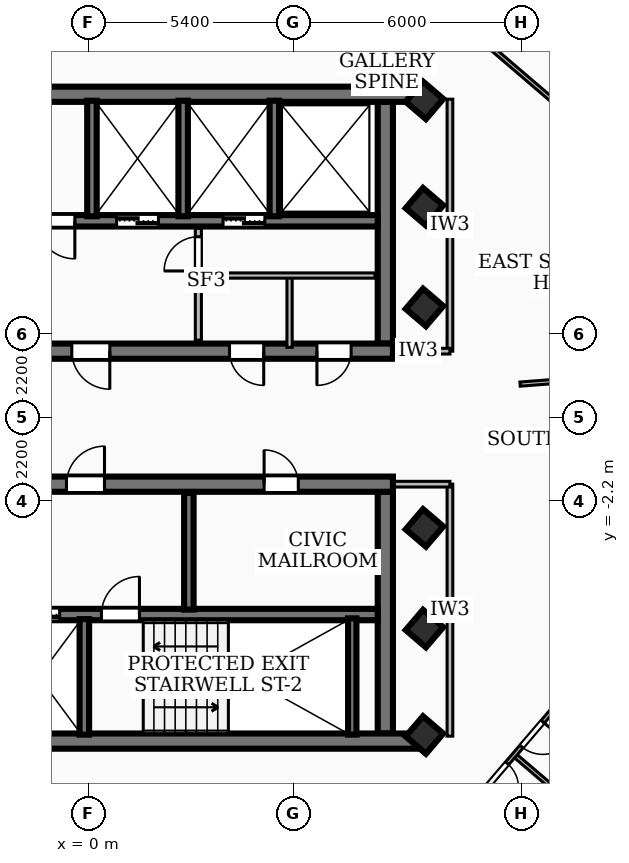
"""IFC4 building model, lengths in metres.
Left out: names, types, materials, properties, quantities, classifications, styles, units other than length and angle.
Written with IfcOpenShell. Run it as: python <this file> out.ifc"""

import sys

from ifc_helpers import new_model, si_unit, direction, frame, frame_2d, origin, origin_2d, place, context, subcontext, project, spatial, rectangle, extrude, element, fill, save


model = new_model("IFC4")
c1 = context("Model", 3, precision=1e-05, world=origin(), true_north=direction((0.0, 1.0)))
c2 = subcontext(c1, "Body", "Model", "MODEL_VIEW")
j1 = project(units=[si_unit("LENGTHUNIT", "METRE"), si_unit("PLANEANGLEUNIT", "RADIAN")], contexts=[c1])
p1 = place(None, origin())
s1 = spatial("IfcSite", under=j1, at=p1, CompositionType="ELEMENT")
p2 = place(p1, origin())
s2 = spatial("IfcBuilding", under=s1, at=p2, CompositionType="ELEMENT")
p3 = place(p2, frame((0.0, 0.0, 254.34)))
s3 = spatial("IfcBuildingStorey", under=s2, at=p3, CompositionType="ELEMENT", Elevation=254.34)
p4 = place(p3, frame((-8.78, 8.51, 0.0), z_axis=(0.0, 0.0, 1.0), x_axis=(1.0, 0.0, 0.0)))
e1 = element("IfcWall", 1, at=p4, inside=s3, PredefinedType="SHEAR", context=c2, shape_type="SweptSolid", body=[
    extrude(rectangle(XDim=17.56, YDim=0.4, at=frame_2d((8.78, 0.0))), origin(), (0.0, 0.0, 1.0), 3.16),
])
p5 = place(p3, frame((8.02, 1.75, 0.0), z_axis=(0.0, 0.0, 1.0), x_axis=(-1.0, 0.0, 0.0)))
e2 = element("IfcWall", 2, at=p5, inside=s3, PredefinedType="SHEAR", context=c2, shape_type="SweptSolid", body=[
    extrude(rectangle(XDim=16.04, YDim=0.4, at=frame_2d((8.02, 0.0))), origin(), (0.0, 0.0, 1.0), 3.16),
])
p6 = place(p5, frame((7.45, 0.0, 0.0)))
e3 = element("IfcOpeningElement", 3, at=p6, cuts=e2, PredefinedType="OPENING", context=c2, shape_type="SweptSolid", body=[
    extrude(rectangle(XDim=1.0, YDim=2.1, at=frame_2d((0.5, 1.05))), frame((0.0, 0.21, 0.0), z_axis=(0.0, -1.0, 0.0), x_axis=(1.0, 0.0, 0.0)), (0.0, 0.0, 1.0), 0.42),
])
p7 = place(p5, frame((14.285, 0.0, 0.0)))
e4 = element("IfcOpeningElement", 4, at=p7, cuts=e2, PredefinedType="OPENING", context=c2, shape_type="SweptSolid", body=[
    extrude(rectangle(XDim=1.05, YDim=2.15, at=frame_2d((0.525, 1.075))), frame((0.0, 0.21, 0.0), z_axis=(0.0, -1.0, 0.0), x_axis=(1.0, 0.0, 0.0)), (0.0, 0.0, 1.0), 0.42),
])
p8 = place(p5, frame((12.725, 0.0, 0.0)))
e5 = element("IfcOpeningElement", 5, at=p8, cuts=e2, PredefinedType="OPENING", context=c2, shape_type="SweptSolid", body=[
    extrude(rectangle(XDim=1.05, YDim=2.15, at=frame_2d((0.525, 1.075))), frame((0.0, 0.21, 0.0), z_axis=(0.0, -1.0, 0.0), x_axis=(1.0, 0.0, 0.0)), (0.0, 0.0, 1.0), 0.42),
])
p9 = place(p5, frame((11.165, 0.0, 0.0)))
e6 = element("IfcOpeningElement", 6, at=p9, cuts=e2, PredefinedType="OPENING", context=c2, shape_type="SweptSolid", body=[
    extrude(rectangle(XDim=1.05, YDim=2.15, at=frame_2d((0.525, 1.075))), frame((0.0, 0.21, 0.0), z_axis=(0.0, -1.0, 0.0), x_axis=(1.0, 0.0, 0.0)), (0.0, 0.0, 1.0), 0.42),
])
p10 = place(p5, frame((3.4, 0.0, 0.0)))
e7 = element("IfcOpeningElement", 7, at=p10, cuts=e2, PredefinedType="OPENING", context=c2, shape_type="SweptSolid", body=[
    extrude(rectangle(XDim=0.9, YDim=2.06, at=frame_2d((0.45, 1.03))), frame((0.0, 0.21, 0.0), z_axis=(0.0, -1.0, 0.0), x_axis=(1.0, 0.0, 0.0)), (0.0, 0.0, 1.0), 0.42),
])
p11 = place(p5, frame((1.1, 0.0, 0.0)))
e8 = element("IfcOpeningElement", 8, at=p11, cuts=e2, PredefinedType="OPENING", context=c2, shape_type="SweptSolid", body=[
    extrude(rectangle(XDim=0.9, YDim=2.06, at=frame_2d((0.45, 1.03))), frame((0.0, 0.21, 0.0), z_axis=(0.0, -1.0, 0.0), x_axis=(1.0, 0.0, 0.0)), (0.0, 0.0, 1.0), 0.42),
])
p12 = place(p3, frame((7.82, 8.31, 0.0), z_axis=(0.0, 0.0, 1.0), x_axis=(0.0, -1.0, 0.0)))
e9 = element("IfcWall", 9, at=p12, inside=s3, PredefinedType="SHEAR", context=c2, shape_type="SweptSolid", body=[
    extrude(rectangle(XDim=6.36, YDim=0.4, at=frame_2d((3.18, 0.0))), origin(), (0.0, 0.0, 1.0), 3.16),
])
p13 = place(p3, frame((7.62, 5.18, 0.0), z_axis=(0.0, 0.0, 1.0), x_axis=(-1.0, 0.0, 0.0)))
e10 = element("IfcWall", 10, at=p13, inside=s3, PredefinedType="SOLIDWALL", context=c2, shape_type="SweptSolid", body=[
    extrude(rectangle(XDim=15.24, YDim=0.3, at=frame_2d((7.62, 0.0))), origin(), (0.0, 0.0, 1.0), 3.16),
])
p14 = place(p13, frame((5.77, 0.0, 0.0)))
e11 = element("IfcOpeningElement", 11, at=p14, cuts=e10, PredefinedType="OPENING", context=c2, shape_type="SweptSolid", body=[
    extrude(rectangle(XDim=1.1, YDim=2.15, at=frame_2d((0.55, 1.075))), frame((0.0, 0.16, 0.0), z_axis=(0.0, -1.0, 0.0), x_axis=(1.0, 0.0, 0.0)), (0.0, 0.0, 1.0), 0.32),
])
p15 = place(p13, frame((2.97, 0.0, 0.0)))
e12 = element("IfcOpeningElement", 12, at=p15, cuts=e10, PredefinedType="OPENING", context=c2, shape_type="SweptSolid", body=[
    extrude(rectangle(XDim=1.1, YDim=2.15, at=frame_2d((0.55, 1.075))), frame((0.0, 0.16, 0.0), z_axis=(0.0, -1.0, 0.0), x_axis=(1.0, 0.0, 0.0)), (0.0, 0.0, 1.0), 0.32),
])
p16 = place(p13, frame((7.97, 0.0, 0.0)))
e13 = element("IfcOpeningElement", 13, at=p16, cuts=e10, PredefinedType="OPENING", context=c2, shape_type="SweptSolid", body=[
    extrude(rectangle(XDim=1.0, YDim=2.1, at=frame_2d((0.5, 1.05))), frame((0.0, 0.16, 0.0), z_axis=(0.0, -1.0, 0.0), x_axis=(1.0, 0.0, 0.0)), (0.0, 0.0, 1.0), 0.32),
])
p17 = place(p3, frame((8.78, -8.51, 0.0), z_axis=(0.0, 0.0, 1.0), x_axis=(-1.0, 0.0, 0.0)))
e14 = element("IfcWall", 14, at=p17, inside=s3, PredefinedType="SHEAR", context=c2, shape_type="SweptSolid", body=[
    extrude(rectangle(XDim=17.56, YDim=0.4, at=frame_2d((8.78, 0.0))), origin(), (0.0, 0.0, 1.0), 3.16),
])
p18 = place(p3, frame((-8.02, -1.75, 0.0), z_axis=(0.0, 0.0, 1.0), x_axis=(1.0, 0.0, 0.0)))
e15 = element("IfcWall", 15, at=p18, inside=s3, PredefinedType="SHEAR", context=c2, shape_type="SweptSolid", body=[
    extrude(rectangle(XDim=16.04, YDim=0.4, at=frame_2d((8.02, 0.0))), origin(), (0.0, 0.0, 1.0), 3.16),
])
p19 = place(p18, frame((7.45, 0.0, 0.0)))
e16 = element("IfcOpeningElement", 16, at=p19, cuts=e15, PredefinedType="OPENING", context=c2, shape_type="SweptSolid", body=[
    extrude(rectangle(XDim=1.0, YDim=2.1, at=frame_2d((0.5, 1.05))), frame((0.0, 0.21, 0.0), z_axis=(0.0, -1.0, 0.0), x_axis=(1.0, 0.0, 0.0)), (0.0, 0.0, 1.0), 0.42),
])
p20 = place(p18, frame((12.65, 0.0, 0.0)))
e17 = element("IfcOpeningElement", 17, at=p20, cuts=e15, PredefinedType="OPENING", context=c2, shape_type="SweptSolid", body=[
    extrude(rectangle(XDim=0.9, YDim=2.06, at=frame_2d((0.45, 1.03))), frame((0.0, 0.21, 0.0), z_axis=(0.0, -1.0, 0.0), x_axis=(1.0, 0.0, 0.0)), (0.0, 0.0, 1.0), 0.42),
])
p21 = place(p18, frame((2.25, 0.0, 0.0)))
e18 = element("IfcOpeningElement", 18, at=p21, cuts=e15, PredefinedType="OPENING", context=c2, shape_type="SweptSolid", body=[
    extrude(rectangle(XDim=0.9, YDim=2.06, at=frame_2d((0.45, 1.03))), frame((0.0, 0.21, 0.0), z_axis=(0.0, -1.0, 0.0), x_axis=(1.0, 0.0, 0.0)), (0.0, 0.0, 1.0), 0.42),
])
p22 = place(p3, frame((7.82, -1.95, 0.0), z_axis=(0.0, 0.0, 1.0), x_axis=(0.0, -1.0, 0.0)))
e19 = element("IfcWall", 19, at=p22, inside=s3, PredefinedType="SHEAR", context=c2, shape_type="SweptSolid", body=[
    extrude(rectangle(XDim=6.36, YDim=0.4, at=frame_2d((3.18, 0.0))), origin(), (0.0, 0.0, 1.0), 3.16),
])
p23 = place(p3, frame((-7.62, -5.18, 0.0), z_axis=(0.0, 0.0, 1.0), x_axis=(1.0, 0.0, 0.0)))
e20 = element("IfcWall", 20, at=p23, inside=s3, PredefinedType="SOLIDWALL", context=c2, shape_type="SweptSolid", body=[
    extrude(rectangle(XDim=15.24, YDim=0.3, at=frame_2d((7.62, 0.0))), origin(), (0.0, 0.0, 1.0), 3.16),
])
p24 = place(p23, frame((5.77, 0.0, 0.0)))
e21 = element("IfcOpeningElement", 21, at=p24, cuts=e20, PredefinedType="OPENING", context=c2, shape_type="SweptSolid", body=[
    extrude(rectangle(XDim=1.1, YDim=2.15, at=frame_2d((0.55, 1.075))), frame((0.0, 0.16, 0.0), z_axis=(0.0, -1.0, 0.0), x_axis=(1.0, 0.0, 0.0)), (0.0, 0.0, 1.0), 0.32),
])
p25 = place(p23, frame((7.97, 0.0, 0.0)))
e22 = element("IfcOpeningElement", 22, at=p25, cuts=e20, PredefinedType="OPENING", context=c2, shape_type="SweptSolid", body=[
    extrude(rectangle(XDim=1.0, YDim=2.1, at=frame_2d((0.5, 1.05))), frame((0.0, 0.16, 0.0), z_axis=(0.0, -1.0, 0.0), x_axis=(1.0, 0.0, 0.0)), (0.0, 0.0, 1.0), 0.32),
])
p26 = place(p3, frame((6.95, -8.34, 0.0), z_axis=(0.0, 0.0, 1.0), x_axis=(0.0, 1.0, 0.0)))
e23 = element("IfcWall", 23, at=p26, inside=s3, PredefinedType="SOLIDWALL", context=c2, shape_type="SweptSolid", body=[
    extrude(rectangle(XDim=3.06, YDim=0.22, at=frame_2d((1.53, 0.0))), origin(), (0.0, 0.0, 1.0), 3.16),
])
for number, where, z_axis, x_axis in (
    (24, (0.1, 5.3, 0.0), (0.0, 0.0, 1.0), (0.0, 1.0, 0.0)),
    (25, (2.5, 5.3, 0.0), (0.0, 0.0, 1.0), (0.0, 1.0, 0.0)),
    (26, (4.9, 5.3, 0.0), (0.0, 0.0, 1.0), (0.0, 1.0, 0.0)),
    (27, (-0.1, -8.34, 0.0), (0.0, 0.0, 1.0), (0.0, 1.0, 0.0)),
):
    element("IfcWall", number, at=place(p3, frame(where, z_axis=z_axis, x_axis=x_axis)), inside=s3, PredefinedType="SOLIDWALL", context=c2, shape_type="SweptSolid", body=[
        extrude(rectangle(XDim=3.04, YDim=0.25, at=frame_2d((1.52, 0.0))), origin(), (0.0, 0.0, 1.0), 3.16),
    ])
p27 = place(p3, frame((2.65, -5.05, 0.0), z_axis=(0.0, 0.0, 1.0), x_axis=(0.0, 1.0, 0.0)))
e28 = element("IfcWall", 28, at=p27, inside=s3, PredefinedType="SOLIDWALL", context=c2, shape_type="SweptSolid", body=[
    extrude(rectangle(XDim=3.07, YDim=0.25, at=frame_2d((1.535, 0.0))), origin(), (0.0, 0.0, 1.0), 3.16),
])
for number, where, z_axis, x_axis in (
    (29, (8.85, -5.55, 0.0), (0.0, 0.0, 1.0), (0.65, 0.76, 0.0)),
    (30, (8.85, -2.9, 0.0), (0.0, 0.0, 1.0), (0.65, 0.76, 0.0)),
    (31, (8.85, 2.9, 0.0), (0.0, 0.0, 1.0), (0.65, 0.76, 0.0)),
    (32, (8.85, 5.55, 0.0), (0.0, 0.0, 1.0), (0.65, 0.76, 0.0)),
    (33, (8.85, -8.35, 0.0), (0.0, 0.0, 1.0), (0.65, 0.76, 0.0)),
    (34, (8.85, 8.35, 0.0), (0.0, 0.0, 1.0), (0.65, 0.76, 0.0)),
):
    element("IfcColumn", number, at=place(p3, frame(where, z_axis=z_axis, x_axis=x_axis)), inside=s3, PredefinedType="COLUMN", context=c2, shape_type="SweptSolid", body=[
        extrude(rectangle(XDim=0.7, YDim=0.7, at=origin_2d()), origin(), (0.0, 0.0, 1.0), 3.42),
    ])
p28 = place(p3, frame((0.451, -19.406, 0.0), z_axis=(0.0, 0.0, 1.0), x_axis=(-0.759723103319, 0.650246727238, 0.0)))
e35 = element("IfcWall", 35, at=p28, inside=s3, PredefinedType="SOLIDWALL", context=c2, shape_type="SweptSolid", body=[
    extrude(rectangle(XDim=25.922, YDim=0.2, at=frame_2d((12.961, 0.0))), origin(), (0.0, 0.0, 1.0), 3.16),
])
p29 = place(p28, frame((19.32, 0.0, 0.85)))
e36 = element("IfcOpeningElement", 36, at=p29, cuts=e35, PredefinedType="OPENING", context=c2, shape_type="SweptSolid", body=[
    extrude(rectangle(XDim=1.8, YDim=2.0, at=frame_2d((0.9, 1.0))), frame((0.0, 0.11, 0.0), z_axis=(0.0, -1.0, 0.0), x_axis=(1.0, 0.0, 0.0)), (0.0, 0.0, 1.0), 0.22),
])
p30 = place(p3, frame((17.943, -9.024, 0.0), z_axis=(0.0, 0.0, 1.0), x_axis=(-0.650218389303, -0.759747356831, 0.0)))
e37 = element("IfcWall", 37, at=p30, inside=s3, PredefinedType="SOLIDWALL", context=c2, shape_type="SweptSolid", body=[
    extrude(rectangle(XDim=9.723, YDim=0.2, at=frame_2d((4.861, 0.0))), origin(), (0.0, 0.0, 1.0), 3.16),
])
p31 = place(p30, frame((0.85, 0.0, 0.85)))
e38 = element("IfcOpeningElement", 38, at=p31, cuts=e37, PredefinedType="OPENING", context=c2, shape_type="SweptSolid", body=[
    extrude(rectangle(XDim=2.7, YDim=1.65, at=frame_2d((1.35, 0.825))), frame((0.0, 0.11, 0.0), z_axis=(0.0, -1.0, 0.0), x_axis=(1.0, 0.0, 0.0)), (0.0, 0.0, 1.0), 0.22),
])
p32 = place(p3, frame((2.9, 2.04, 0.0), z_axis=(0.0, 0.0, 1.0), x_axis=(0.0, 1.0, 0.0)))
e39 = element("IfcWall", 39, at=p32, inside=s3, PredefinedType="PARTITIONING", context=c2, shape_type="SweptSolid", body=[
    extrude(rectangle(XDim=2.94, YDim=0.16, at=frame_2d((1.47, 0.0))), origin(), (0.0, 0.0, 1.0), 2.39),
])
p33 = place(p32, frame((1.82, 0.0, 0.0)))
e40 = element("IfcOpeningElement", 40, at=p33, cuts=e39, PredefinedType="OPENING", context=c2, shape_type="SweptSolid", body=[
    extrude(rectangle(XDim=0.9, YDim=2.06, at=frame_2d((0.45, 1.03))), frame((0.0, 0.09, 0.0), z_axis=(0.0, -1.0, 0.0), x_axis=(1.0, 0.0, 0.0)), (0.0, 0.0, 1.0), 0.18),
])
p34 = place(p3, frame((2.9, 3.74, 0.0), z_axis=(0.0, 0.0, 1.0), x_axis=(1.0, 0.0, 0.0)))
e41 = element("IfcWall", 41, at=p34, inside=s3, PredefinedType="PARTITIONING", context=c2, shape_type="SweptSolid", body=[
    extrude(rectangle(XDim=4.65, YDim=0.138, at=frame_2d((2.325, 0.0))), origin(), (0.0, 0.0, 1.0), 3.16),
])
p35 = place(p3, frame((5.3, 1.85, 0.0), z_axis=(0.0, 0.0, 1.0), x_axis=(0.0, 1.0, 0.0)))
e42 = element("IfcWall", 42, at=p35, inside=s3, PredefinedType="PARTITIONING", context=c2, shape_type="SweptSolid", body=[
    extrude(rectangle(XDim=1.89, YDim=0.138, at=frame_2d((0.945, 0.0))), origin(), (0.0, 0.0, 1.0), 2.39),
])
p36 = place(p3, frame((9.52, 1.75, 0.0), z_axis=(0.0, 0.0, 1.0), x_axis=(0.0, 1.0, 0.0)))
e43 = element("IfcWall", 43, at=p36, inside=s3, PredefinedType="PARTITIONING", context=c2, shape_type="SweptSolid", body=[
    extrude(rectangle(XDim=6.63, YDim=0.15, at=frame_2d((3.315, 0.0))), origin(), (0.0, 0.0, 1.0), 3.16),
])
p37 = place(p3, frame((7.85, 1.75, 0.0), z_axis=(0.0, 0.0, 1.0), x_axis=(1.0, 0.0, 0.0)))
e44 = element("IfcWall", 44, at=p37, inside=s3, PredefinedType="PARTITIONING", context=c2, shape_type="SweptSolid", body=[
    extrude(rectangle(XDim=1.67, YDim=0.15, at=frame_2d((0.835, 0.0))), origin(), (0.0, 0.0, 1.0), 2.39),
])
p38 = place(p3, frame((9.52, -8.38, 0.0), z_axis=(0.0, 0.0, 1.0), x_axis=(0.0, 1.0, 0.0)))
e45 = element("IfcWall", 45, at=p38, inside=s3, PredefinedType="PARTITIONING", context=c2, shape_type="SweptSolid", body=[
    extrude(rectangle(XDim=6.63, YDim=0.15, at=frame_2d((3.315, 0.0))), origin(), (0.0, 0.0, 1.0), 2.53),
])
p39 = place(p3, frame((7.85, -1.75, 0.0), z_axis=(0.0, 0.0, 1.0), x_axis=(1.0, 0.0, 0.0)))
e46 = element("IfcWall", 46, at=p39, inside=s3, PredefinedType="PARTITIONING", context=c2, shape_type="SweptSolid", body=[
    extrude(rectangle(XDim=1.67, YDim=0.15, at=frame_2d((0.835, 0.0))), origin(), (0.0, 0.0, 1.0), 2.39),
])
p40 = place(p3, frame((11.366, 0.883, 0.0), z_axis=(0.0, 0.0, 1.0), x_axis=(0.997001087863, 0.077387536463, 0.0)))
e47 = element("IfcWall", 47, at=p40, inside=s3, PredefinedType="PARTITIONING", context=c2, shape_type="SweptSolid", body=[
    extrude(rectangle(XDim=8.294, YDim=0.11, at=frame_2d((4.147, 0.0))), origin(), (0.0, 0.0, 1.0), 3.16),
])
p41 = place(p3, frame((16.372, 4.796, 0.0), z_axis=(0.0, 0.0, 1.0), x_axis=(-0.759640163548, 0.650343618348, 0.0)))
e48 = element("IfcWall", 48, at=p41, inside=s3, PredefinedType="PARTITIONING", context=c2, shape_type="SweptSolid", body=[
    extrude(rectangle(XDim=7.95, YDim=0.11, at=frame_2d((3.975, 0.0))), origin(), (0.0, 0.0, 1.0), 2.53),
])
p42 = place(p3, frame((6.252, 16.894, 0.0), z_axis=(0.0, 0.0, 1.0), x_axis=(0.759715677597, -0.650255403063, 0.0)))
e49 = element("IfcWall", 49, at=p42, inside=s3, PredefinedType="PARTITIONING", context=c2, shape_type="SweptSolid", body=[
    extrude(rectangle(XDim=12.571, YDim=0.11, at=frame_2d((6.285, 0.0))), origin(), (0.0, 0.0, 1.0), 2.53),
])
p43 = place(p42, frame((6.655, 0.0, 0.0)))
e50 = element("IfcOpeningElement", 50, at=p43, cuts=e49, PredefinedType="OPENING", context=c2, shape_type="SweptSolid", body=[
    extrude(rectangle(XDim=0.86, YDim=2.04, at=frame_2d((0.43, 1.02))), frame((0.0, 0.065, 0.0), z_axis=(0.0, -1.0, 0.0), x_axis=(1.0, 0.0, 0.0)), (0.0, 0.0, 1.0), 0.13),
])
p44 = place(p42, frame((5.455, 0.0, 0.0)))
e51 = element("IfcOpeningElement", 51, at=p44, cuts=e49, PredefinedType="OPENING", context=c2, shape_type="SweptSolid", body=[
    extrude(rectangle(XDim=0.86, YDim=2.04, at=frame_2d((0.43, 1.02))), frame((0.0, 0.065, 0.0), z_axis=(0.0, -1.0, 0.0), x_axis=(1.0, 0.0, 0.0)), (0.0, 0.0, 1.0), 0.13),
])
p45 = place(p3, frame((11.26, -8.913, 0.0), z_axis=(0.0, 0.0, 1.0), x_axis=(0.759673292451, -0.650304919816, 0.0)))
e52 = element("IfcWall", 52, at=p45, inside=s3, PredefinedType="PARTITIONING", context=c2, shape_type="SweptSolid", body=[
    extrude(rectangle(XDim=5.085, YDim=0.11, at=frame_2d((2.542, 0.0))), origin(), (0.0, 0.0, 1.0), 3.16),
])
p46 = place(p3, frame((17.437, -1.604, 0.0), z_axis=(0.0, 0.0, 1.0), x_axis=(-0.650265099033, -0.759707378522, 0.0)))
e53 = element("IfcWall", 53, at=p46, inside=s3, PredefinedType="PARTITIONING", context=c2, shape_type="SweptSolid", body=[
    extrude(rectangle(XDim=20.139, YDim=0.11, at=frame_2d((10.07, 0.0))), origin(), (0.0, 0.0, 1.0), 2.53),
])
p47 = place(p46, frame((9.859, 0.0, 0.0)))
e54 = element("IfcOpeningElement", 54, at=p47, cuts=e53, PredefinedType="OPENING", context=c2, shape_type="SweptSolid", body=[
    extrude(rectangle(XDim=0.86, YDim=2.04, at=frame_2d((0.43, 1.02))), frame((0.0, 0.065, 0.0), z_axis=(0.0, -1.0, 0.0), x_axis=(1.0, 0.0, 0.0)), (0.0, 0.0, 1.0), 0.13),
])
p48 = place(p46, frame((8.419, 0.0, 0.0)))
e55 = element("IfcOpeningElement", 55, at=p48, cuts=e53, PredefinedType="OPENING", context=c2, shape_type="SweptSolid", body=[
    extrude(rectangle(XDim=0.86, YDim=2.04, at=frame_2d((0.43, 1.02))), frame((0.0, 0.065, 0.0), z_axis=(0.0, -1.0, 0.0), x_axis=(1.0, 0.0, 0.0)), (0.0, 0.0, 1.0), 0.13),
])
p49 = place(p6, origin())
e56 = element("IfcDoor", 56, at=p49, inside=s3, OperationType="SINGLE_SWING_LEFT", PredefinedType="DOOR", context=c2, shape_type="SweptSolid", body=[
    extrude(rectangle(XDim=1.0, YDim=2.1, at=frame_2d((0.5, 1.05))), frame((0.0, 0.025, 0.0), z_axis=(0.0, -1.0, 0.0), x_axis=(1.0, 0.0, 0.0)), (0.0, 0.0, 1.0), 0.05),
])
fill(e3, e56)
p50 = place(p19, origin())
e57 = element("IfcDoor", 57, at=p50, inside=s3, OperationType="SINGLE_SWING_RIGHT", PredefinedType="DOOR", context=c2, shape_type="SweptSolid", body=[
    extrude(rectangle(XDim=1.0, YDim=2.1, at=frame_2d((0.5, 1.05))), frame((0.0, 0.025, 0.0), z_axis=(0.0, -1.0, 0.0), x_axis=(1.0, 0.0, 0.0)), (0.0, 0.0, 1.0), 0.05),
])
fill(e16, e57)
p51 = place(p14, origin())
e58 = element("IfcDoor", 58, at=p51, inside=s3, OperationType="DOUBLE_DOOR_SLIDING", PredefinedType="DOOR", context=c2, shape_type="SweptSolid", body=[
    extrude(rectangle(XDim=1.1, YDim=2.15, at=frame_2d((0.55, 1.075))), frame((0.0, 0.025, 0.0), z_axis=(0.0, -1.0, 0.0), x_axis=(1.0, 0.0, 0.0)), (0.0, 0.0, 1.0), 0.05),
])
fill(e11, e58)
p52 = place(p15, origin())
e59 = element("IfcDoor", 59, at=p52, inside=s3, OperationType="DOUBLE_DOOR_SLIDING", PredefinedType="DOOR", context=c2, shape_type="SweptSolid", body=[
    extrude(rectangle(XDim=1.1, YDim=2.15, at=frame_2d((0.55, 1.075))), frame((0.0, 0.025, 0.0), z_axis=(0.0, -1.0, 0.0), x_axis=(1.0, 0.0, 0.0)), (0.0, 0.0, 1.0), 0.05),
])
fill(e12, e59)
p53 = place(p16, origin())
e60 = element("IfcDoor", 60, at=p53, inside=s3, OperationType="SINGLE_SWING_LEFT", PredefinedType="DOOR", context=c2, shape_type="SweptSolid", body=[
    extrude(rectangle(XDim=1.0, YDim=2.1, at=frame_2d((0.5, 1.05))), frame((0.0, 0.025, 0.0), z_axis=(0.0, -1.0, 0.0), x_axis=(1.0, 0.0, 0.0)), (0.0, 0.0, 1.0), 0.05),
])
fill(e13, e60)
p54 = place(p24, origin())
e61 = element("IfcDoor", 61, at=p54, inside=s3, OperationType="DOUBLE_DOOR_SLIDING", PredefinedType="DOOR", context=c2, shape_type="SweptSolid", body=[
    extrude(rectangle(XDim=1.1, YDim=2.15, at=frame_2d((0.55, 1.075))), frame((0.0, 0.025, 0.0), z_axis=(0.0, -1.0, 0.0), x_axis=(1.0, 0.0, 0.0)), (0.0, 0.0, 1.0), 0.05),
])
fill(e21, e61)
p55 = place(p25, origin())
e62 = element("IfcDoor", 62, at=p55, inside=s3, OperationType="SINGLE_SWING_RIGHT", PredefinedType="DOOR", context=c2, shape_type="SweptSolid", body=[
    extrude(rectangle(XDim=1.0, YDim=2.1, at=frame_2d((0.5, 1.05))), frame((0.0, 0.025, 0.0), z_axis=(0.0, -1.0, 0.0), x_axis=(1.0, 0.0, 0.0)), (0.0, 0.0, 1.0), 0.05),
])
fill(e22, e62)
p56 = place(p20, origin())
e63 = element("IfcDoor", 63, at=p56, inside=s3, OperationType="SINGLE_SWING_LEFT", PredefinedType="DOOR", context=c2, shape_type="SweptSolid", body=[
    extrude(rectangle(XDim=0.9, YDim=2.06, at=frame_2d((0.45, 1.03))), frame((0.0, 0.025, 0.0), z_axis=(0.0, -1.0, 0.0), x_axis=(1.0, 0.0, 0.0)), (0.0, 0.0, 1.0), 0.05),
])
fill(e17, e63)
p57 = place(p10, origin())
e64 = element("IfcDoor", 64, at=p57, inside=s3, OperationType="SINGLE_SWING_LEFT", PredefinedType="DOOR", context=c2, shape_type="SweptSolid", body=[
    extrude(rectangle(XDim=0.9, YDim=2.06, at=frame_2d((0.45, 1.03))), frame((0.0, 0.025, 0.0), z_axis=(0.0, -1.0, 0.0), x_axis=(1.0, 0.0, 0.0)), (0.0, 0.0, 1.0), 0.05),
])
fill(e7, e64)
p58 = place(p11, origin())
e65 = element("IfcDoor", 65, at=p58, inside=s3, OperationType="SINGLE_SWING_RIGHT", PredefinedType="DOOR", context=c2, shape_type="SweptSolid", body=[
    extrude(rectangle(XDim=0.9, YDim=2.06, at=frame_2d((0.45, 1.03))), frame((0.0, 0.025, 0.0), z_axis=(0.0, -1.0, 0.0), x_axis=(1.0, 0.0, 0.0)), (0.0, 0.0, 1.0), 0.05),
])
fill(e8, e65)
p59 = place(p33, origin())
e66 = element("IfcDoor", 66, at=p59, inside=s3, OperationType="SINGLE_SWING_LEFT", PredefinedType="DOOR", context=c2, shape_type="SweptSolid", body=[
    extrude(rectangle(XDim=0.9, YDim=2.06, at=frame_2d((0.45, 1.03))), frame((0.0, 0.025, 0.0), z_axis=(0.0, -1.0, 0.0), x_axis=(1.0, 0.0, 0.0)), (0.0, 0.0, 1.0), 0.05),
])
fill(e40, e66)
p60 = place(p47, origin())
e67 = element("IfcDoor", 67, at=p60, inside=s3, OperationType="SINGLE_SWING_RIGHT", PredefinedType="DOOR", context=c2, shape_type="SweptSolid", body=[
    extrude(rectangle(XDim=0.86, YDim=2.04, at=frame_2d((0.43, 1.02))), frame((0.0, 0.025, 0.0), z_axis=(0.0, -1.0, 0.0), x_axis=(1.0, 0.0, 0.0)), (0.0, 0.0, 1.0), 0.05),
])
fill(e54, e67)
p61 = place(p48, origin())
e68 = element("IfcDoor", 68, at=p61, inside=s3, OperationType="SINGLE_SWING_LEFT", PredefinedType="DOOR", context=c2, shape_type="SweptSolid", body=[
    extrude(rectangle(XDim=0.86, YDim=2.04, at=frame_2d((0.43, 1.02))), frame((0.0, 0.025, 0.0), z_axis=(0.0, -1.0, 0.0), x_axis=(1.0, 0.0, 0.0)), (0.0, 0.0, 1.0), 0.05),
])
fill(e55, e68)
save(model, sys.argv[1])
